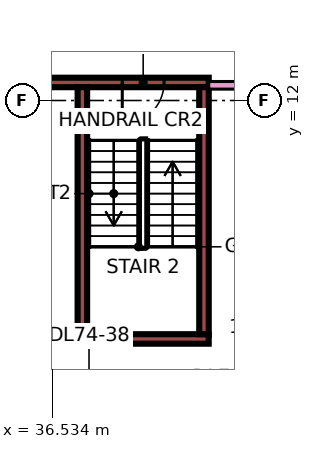
"""IFC4 building model, lengths in metres.
Left out: names, types, materials, properties, quantities, classifications, styles, units other than length and angle.
Written with IfcOpenShell. Run it as: python <this file> out.ifc"""

import sys

from ifc_helpers import new_model, si_unit, direction, frame, frame_2d, origin, place, context, subcontext, project, spatial, rectangle, extrude, element, fill, save


model = new_model("IFC4")
c1 = context("Model", 3, precision=1e-05, world=origin(), true_north=direction((0.0, 1.0)))
c2 = subcontext(c1, "Body", "Model", "MODEL_VIEW")
j1 = project(units=[si_unit("LENGTHUNIT", "METRE"), si_unit("PLANEANGLEUNIT", "RADIAN")], contexts=[c1])
p1 = place(None, origin())
s1 = spatial("IfcSite", under=j1, at=p1, CompositionType="ELEMENT")
p2 = place(p1, origin())
s2 = spatial("IfcBuilding", under=s1, at=p2, CompositionType="ELEMENT")
p3 = place(p2, frame((0.0, 0.0, 314.65)))
s3 = spatial("IfcBuildingStorey", under=s2, at=p3, CompositionType="ELEMENT", Elevation=314.65)
p4 = place(p3, frame((37.2, 5.725, 0.0), z_axis=(0.0, 0.0, 1.0), x_axis=(1.0, 0.0, 0.0)))
e1 = element("IfcWall", 1, at=p4, inside=s3, PredefinedType="SHEAR", context=c2, shape_type="SweptSolid", body=[
    extrude(rectangle(XDim=3.45, YDim=0.25, at=frame_2d((1.725, 0.0))), origin(), (0.0, 0.0, 1.0), 3.75),
])
p5 = place(p3, frame((36.4, 12.475, 0.0), z_axis=(0.0, 0.0, 1.0), x_axis=(1.0, 0.0, 0.0)))
e2 = element("IfcWall", 2, at=p5, inside=s3, PredefinedType="SHEAR", context=c2, shape_type="SweptSolid", body=[
    extrude(rectangle(XDim=4.25, YDim=0.25, at=frame_2d((2.125, 0.0))), origin(), (0.0, 0.0, 1.0), 3.75),
])
p6 = place(p5, frame((1.975, 0.0, 0.0)))
e3 = element("IfcOpeningElement", 3, at=p6, cuts=e2, PredefinedType="OPENING", context=c2, shape_type="SweptSolid", body=[
    extrude(rectangle(XDim=1.1, YDim=2.2, at=frame_2d((0.55, 1.1))), frame((0.0, 0.135, 0.0), z_axis=(0.0, -1.0, 0.0), x_axis=(1.0, 0.0, 0.0)), (0.0, 0.0, 1.0), 0.27),
])
for number, where, z_axis, x_axis in (
    (4, (37.325, 5.85, 0.0), (0.0, 0.0, 1.0), (0.0, 1.0, 0.0)),
    (5, (40.525, 5.85, 0.0), (0.0, 0.0, 1.0), (0.0, 1.0, 0.0)),
):
    element("IfcWall", number, at=place(p3, frame(where, z_axis=z_axis, x_axis=x_axis)), inside=s3, PredefinedType="SHEAR", context=c2, shape_type="SweptSolid", body=[
        extrude(rectangle(XDim=6.5, YDim=0.25, at=frame_2d((3.25, 0.0))), origin(), (0.0, 0.0, 1.0), 3.75),
    ])
p7 = place(p3, frame((40.65, 12.4, 0.0), z_axis=(0.0, 0.0, 1.0), x_axis=(1.0, 0.0, 0.0)))
e6 = element("IfcWall", 6, at=p7, inside=s3, PredefinedType="PARTITIONING", context=c2, shape_type="SweptSolid", body=[
    extrude(rectangle(XDim=22.276, YDim=0.2, at=frame_2d((11.138, 0.0))), origin(), (0.0, 0.0, 1.0), 3.35),
])
p8 = place(p7, frame((20.4, 0.0, 0.0)))
e7 = element("IfcOpeningElement", 7, at=p8, cuts=e6, PredefinedType="OPENING", context=c2, shape_type="SweptSolid", body=[
    extrude(rectangle(XDim=1.0, YDim=2.1, at=frame_2d((0.5, 1.05))), frame((0.0, 0.11, 0.0), z_axis=(0.0, -1.0, 0.0), x_axis=(1.0, 0.0, 0.0)), (0.0, 0.0, 1.0), 0.22),
])
p9 = place(p7, frame((1.05, 0.0, 0.0)))
e8 = element("IfcOpeningElement", 8, at=p9, cuts=e6, PredefinedType="OPENING", context=c2, shape_type="SweptSolid", body=[
    extrude(rectangle(XDim=1.0, YDim=2.1, at=frame_2d((0.5, 1.05))), frame((0.0, 0.11, 0.0), z_axis=(0.0, -1.0, 0.0), x_axis=(1.0, 0.0, 0.0)), (0.0, 0.0, 1.0), 0.22),
])
p10 = place(p6, frame((1.1, 0.0, 0.0), z_axis=(0.0, 0.0, 1.0), x_axis=(-1.0, 0.0, 0.0)))
e9 = element("IfcDoor", 9, at=p10, inside=s3, OperationType="SINGLE_SWING_LEFT", PredefinedType="DOOR", context=c2, shape_type="SweptSolid", body=[
    extrude(rectangle(XDim=1.1, YDim=2.2, at=frame_2d((0.55, 1.1))), frame((0.0, 0.025, 0.0), z_axis=(0.0, -1.0, 0.0), x_axis=(1.0, 0.0, 0.0)), (0.0, 0.0, 1.0), 0.05),
])
fill(e3, e9)
save(model, sys.argv[1])
